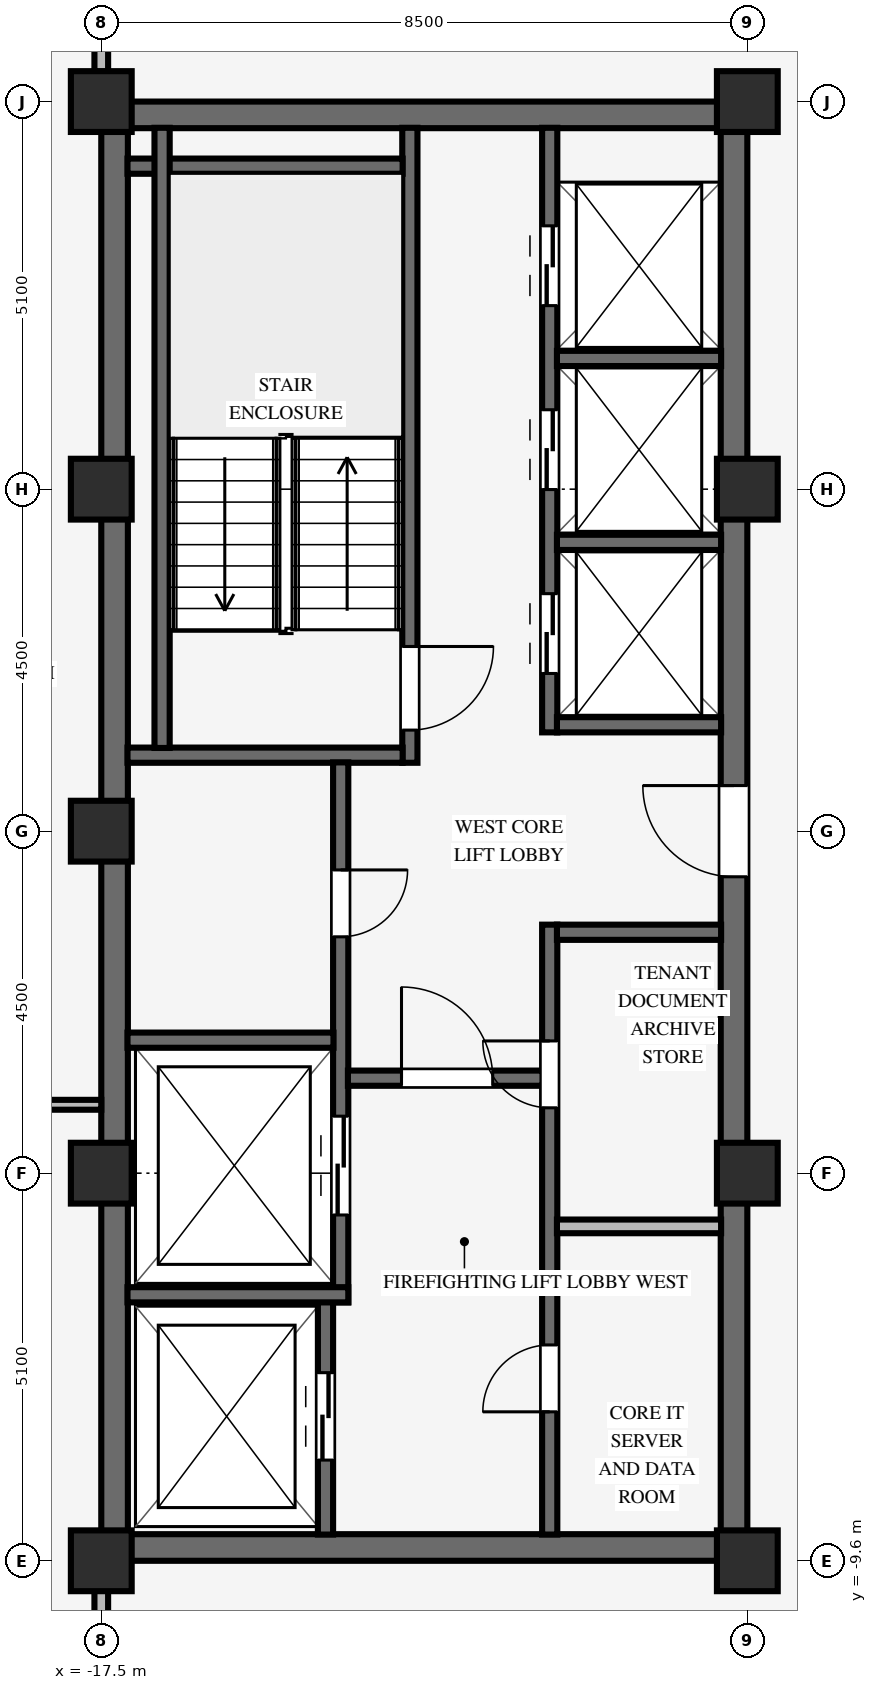
"""IFC4 building model, lengths in metres.
Left out: names, types, materials, properties, quantities, classifications, styles, units other than length and angle.
Written with IfcOpenShell. Run it as: python <this file> out.ifc"""

import sys

from ifc_helpers import new_model, si_unit, direction, frame, frame_2d, origin, origin_2d, place, context, subcontext, project, spatial, rectangle, extrude, source, transform, mapped, element, fill, save


model = new_model("IFC4")
c1 = context("Model", 3, precision=1e-05, world=origin(), true_north=direction((0.0, 1.0)))
c2 = subcontext(c1, "Body", "Model", "MODEL_VIEW")
j1 = project(units=[si_unit("LENGTHUNIT", "METRE"), si_unit("PLANEANGLEUNIT", "RADIAN")], contexts=[c1])
p1 = place(None, origin())
s1 = spatial("IfcSite", under=j1, at=p1, CompositionType="ELEMENT")
p2 = place(p1, origin())
s2 = spatial("IfcBuilding", under=s1, at=p2, CompositionType="ELEMENT")
p3 = place(p2, frame((0.0, 0.0, 268.9)))
s3 = spatial("IfcBuildingStorey", under=s2, at=p3, CompositionType="ELEMENT", Elevation=268.9)
for number, where, z_axis, x_axis in (
    (1, (-17.5, -9.425, 0.0), (0.0, 0.0, 1.0), (1.0, 0.0, 0.0)),
    (2, (-17.5, 9.425, 0.0), (0.0, 0.0, 1.0), (1.0, 0.0, 0.0)),
):
    element("IfcWall", number, at=place(p3, frame(where, z_axis=z_axis, x_axis=x_axis)), inside=s3, PredefinedType="SHEAR", context=c2, shape_type="SweptSolid", body=[
        extrude(rectangle(XDim=8.5, YDim=0.35, at=frame_2d((4.25, 0.0))), origin(), (0.0, 0.0, 1.0), 3.37),
    ])
p4 = place(p3, frame((-17.325, -9.255, 0.0), z_axis=(0.0, 0.0, 1.0), x_axis=(0.0, 1.0, 0.0)))
e3 = element("IfcWall", 3, at=p4, inside=s3, PredefinedType="SHEAR", context=c2, shape_type="SweptSolid", body=[
    extrude(rectangle(XDim=18.51, YDim=0.35, at=frame_2d((9.255, 0.0))), origin(), (0.0, 0.0, 1.0), 3.37),
])
p5 = place(p3, frame((-9.175, -9.255, 0.0), z_axis=(0.0, 0.0, 1.0), x_axis=(0.0, 1.0, 0.0)))
e4 = element("IfcWall", 4, at=p5, inside=s3, PredefinedType="SHEAR", context=c2, shape_type="SweptSolid", body=[
    extrude(rectangle(XDim=18.51, YDim=0.35, at=frame_2d((9.255, 0.0))), origin(), (0.0, 0.0, 1.0), 3.37),
])
p6 = place(p5, frame((8.655, 0.0, 0.0)))
e5 = element("IfcOpeningElement", 5, at=p6, cuts=e4, PredefinedType="OPENING", context=c2, shape_type="SweptSolid", body=[
    extrude(rectangle(XDim=1.2, YDim=2.15, at=frame_2d((0.6, 1.075))), frame((0.0, 0.185, 0.0), z_axis=(0.0, -1.0, 0.0), x_axis=(1.0, 0.0, 0.0)), (0.0, 0.0, 1.0), 0.37),
])
for number, where, z_axis, x_axis in (
    (6, (-17.5, -9.6, 0.0), (0.0, 0.0, 1.0), (1.0, 0.0, 0.0)),
    (7, (-17.5, -4.5, 0.0), (0.0, 0.0, 1.0), (1.0, 0.0, 0.0)),
    (8, (-17.5, 4.5, 0.0), (0.0, 0.0, 1.0), (1.0, 0.0, 0.0)),
    (9, (-17.5, 9.6, 0.0), (0.0, 0.0, 1.0), (1.0, 0.0, 0.0)),
    (10, (-9.0, -9.6, 0.0), (0.0, 0.0, 1.0), (1.0, 0.0, 0.0)),
    (11, (-9.0, -4.5, 0.0), (0.0, 0.0, 1.0), (1.0, 0.0, 0.0)),
    (12, (-9.0, 4.5, 0.0), (0.0, 0.0, 1.0), (1.0, 0.0, 0.0)),
    (13, (-9.0, 9.6, 0.0), (0.0, 0.0, 1.0), (1.0, 0.0, 0.0)),
    (14, (-17.5, 0.0, 0.0), (0.0, 0.0, 1.0), (1.0, 0.0, 0.0)),
):
    element("IfcColumn", number, at=place(p3, frame(where, z_axis=z_axis, x_axis=x_axis)), inside=s3, PredefinedType="COLUMN", context=c2, shape_type="SweptSolid", body=[
        extrude(rectangle(XDim=0.8, YDim=0.8, at=origin_2d()), origin(), (0.0, 0.0, 1.0), 3.37),
    ])
p7 = place(p3, frame((-13.44, 0.9, 0.0), z_axis=(0.0, 0.0, 1.0), x_axis=(0.0, 1.0, 0.0)))
e15 = element("IfcWall", 15, at=p7, inside=s3, PredefinedType="SHEAR", context=c2, shape_type="SweptSolid", body=[
    extrude(rectangle(XDim=8.355, YDim=0.2, at=frame_2d((4.177, 0.0))), origin(), (0.0, 0.0, 1.0), 3.37),
])
p8 = place(p7, frame((1.53, 0.0, 0.0), z_axis=(0.0, 0.0, 1.0), x_axis=(-1.0, 0.0, 0.0)))
e16 = element("IfcOpeningElement", 16, at=p8, cuts=e15, PredefinedType="OPENING", context=c2, shape_type="SweptSolid", body=[
    extrude(rectangle(XDim=1.1, YDim=2.15, at=frame_2d((0.55, 1.075))), frame((0.0, 0.11, 0.0), z_axis=(0.0, -1.0, 0.0), x_axis=(1.0, 0.0, 0.0)), (0.0, 0.0, 1.0), 0.22),
])
for number, where, z_axis, x_axis in (
    (17, (-17.155, 1.0, 0.0), (0.0, 0.0, 1.0), (1.0, 0.0, 0.0)),
    (18, (-17.155, 8.75, 0.0), (0.0, 0.0, 1.0), (1.0, 0.0, 0.0)),
):
    element("IfcWall", number, at=place(p3, frame(where, z_axis=z_axis, x_axis=x_axis)), inside=s3, PredefinedType="SHEAR", context=c2, shape_type="SweptSolid", body=[
        extrude(rectangle(XDim=3.62, YDim=0.2, at=frame_2d((1.81, 0.0))), origin(), (0.0, 0.0, 1.0), 3.37),
    ])
p9 = place(p3, frame((-16.7, 1.095, 0.0), z_axis=(0.0, 0.0, 1.0), x_axis=(0.0, 1.0, 0.0)))
e19 = element("IfcWall", 19, at=p9, inside=s3, PredefinedType="SHEAR", context=c2, shape_type="SweptSolid", body=[
    extrude(rectangle(XDim=8.16, YDim=0.2, at=frame_2d((4.08, 0.0))), origin(), (0.0, 0.0, 1.0), 3.37),
])
p10 = place(p3, frame((-14.55, -9.255, 0.0), z_axis=(0.0, 0.0, 1.0), x_axis=(0.0, 1.0, 0.0)))
e20 = element("IfcWall", 20, at=p10, inside=s3, PredefinedType="SHEAR", context=c2, shape_type="SweptSolid", body=[
    extrude(rectangle(XDim=3.06, YDim=0.2, at=frame_2d((1.53, 0.0))), origin(), (0.0, 0.0, 1.0), 3.37),
])
p11 = place(p10, frame((0.98, 0.0, 0.0)))
e21 = element("IfcOpeningElement", 21, at=p11, cuts=e20, PredefinedType="OPENING", context=c2, shape_type="SweptSolid", body=[
    extrude(rectangle(XDim=1.15, YDim=2.15, at=frame_2d((0.575, 1.075))), frame((0.0, 0.11, 0.0), z_axis=(0.0, -1.0, 0.0), x_axis=(1.0, 0.0, 0.0)), (0.0, 0.0, 1.0), 0.22),
])
p12 = place(p3, frame((-14.35, -6.2, 0.0), z_axis=(0.0, 0.0, 1.0), x_axis=(0.0, 1.0, 0.0)))
e22 = element("IfcWall", 22, at=p12, inside=s3, PredefinedType="SHEAR", context=c2, shape_type="SweptSolid", body=[
    extrude(rectangle(XDim=7.105, YDim=0.2, at=frame_2d((3.552, 0.0))), origin(), (0.0, 0.0, 1.0), 3.37),
])
p13 = place(p12, frame((5.69, 0.0, 0.0), z_axis=(0.0, 0.0, 1.0), x_axis=(-1.0, 0.0, 0.0)))
e23 = element("IfcOpeningElement", 23, at=p13, cuts=e22, PredefinedType="OPENING", context=c2, shape_type="SweptSolid", body=[
    extrude(rectangle(XDim=0.88, YDim=2.1, at=frame_2d((0.44, 1.05))), frame((0.0, 0.11, 0.0), z_axis=(0.0, -1.0, 0.0), x_axis=(1.0, 0.0, 0.0)), (0.0, 0.0, 1.0), 0.22),
])
p14 = place(p12, frame((1.15, 0.0, 0.0)))
e24 = element("IfcOpeningElement", 24, at=p14, cuts=e22, PredefinedType="OPENING", context=c2, shape_type="SweptSolid", body=[
    extrude(rectangle(XDim=1.3, YDim=2.2, at=frame_2d((0.65, 1.1))), frame((0.0, 0.11, 0.0), z_axis=(0.0, -1.0, 0.0), x_axis=(1.0, 0.0, 0.0)), (0.0, 0.0, 1.0), 0.22),
])
p15 = place(p3, frame((-17.155, -6.1, 0.0), z_axis=(0.0, 0.0, 1.0), x_axis=(1.0, 0.0, 0.0)))
e25 = element("IfcWall", 25, at=p15, inside=s3, PredefinedType="SHEAR", context=c2, shape_type="SweptSolid", body=[
    extrude(rectangle(XDim=2.905, YDim=0.2, at=frame_2d((1.453, 0.0))), origin(), (0.0, 0.0, 1.0), 3.37),
])
p16 = place(p3, frame((-17.155, -2.75, 0.0), z_axis=(0.0, 0.0, 1.0), x_axis=(1.0, 0.0, 0.0)))
e26 = element("IfcWall", 26, at=p16, inside=s3, PredefinedType="SHEAR", context=c2, shape_type="SweptSolid", body=[
    extrude(rectangle(XDim=2.71, YDim=0.2, at=frame_2d((1.355, 0.0))), origin(), (0.0, 0.0, 1.0), 3.37),
])
p17 = place(p3, frame((-11.6, -9.255, 0.0), z_axis=(0.0, 0.0, 1.0), x_axis=(0.0, 1.0, 0.0)))
e27 = element("IfcWall", 27, at=p17, inside=s3, PredefinedType="SHEAR", context=c2, shape_type="SweptSolid", body=[
    extrude(rectangle(XDim=8.025, YDim=0.2, at=frame_2d((4.012, 0.0))), origin(), (0.0, 0.0, 1.0), 3.37),
])
p18 = place(p17, frame((1.615, 0.0, 0.0)))
e28 = element("IfcOpeningElement", 28, at=p18, cuts=e27, PredefinedType="OPENING", context=c2, shape_type="SweptSolid", body=[
    extrude(rectangle(XDim=0.88, YDim=2.1, at=frame_2d((0.44, 1.05))), frame((0.0, 0.11, 0.0), z_axis=(0.0, -1.0, 0.0), x_axis=(1.0, 0.0, 0.0)), (0.0, 0.0, 1.0), 0.22),
])
p19 = place(p17, frame((5.615, 0.0, 0.0)))
e29 = element("IfcOpeningElement", 29, at=p19, cuts=e27, PredefinedType="OPENING", context=c2, shape_type="SweptSolid", body=[
    extrude(rectangle(XDim=0.88, YDim=2.1, at=frame_2d((0.44, 1.05))), frame((0.0, 0.11, 0.0), z_axis=(0.0, -1.0, 0.0), x_axis=(1.0, 0.0, 0.0)), (0.0, 0.0, 1.0), 0.22),
])
p20 = place(p3, frame((-14.255, -3.25, 0.0), z_axis=(0.0, 0.0, 1.0), x_axis=(1.0, 0.0, 0.0)))
e30 = element("IfcWall", 30, at=p20, inside=s3, PredefinedType="SHEAR", context=c2, shape_type="SweptSolid", body=[
    extrude(rectangle(XDim=2.56, YDim=0.2, at=frame_2d((1.28, 0.0))), origin(), (0.0, 0.0, 1.0), 3.37),
])
p21 = place(p20, frame((0.705, 0.0, 0.0)))
e31 = element("IfcOpeningElement", 31, at=p21, cuts=e30, PredefinedType="OPENING", context=c2, shape_type="SweptSolid", body=[
    extrude(rectangle(XDim=1.2, YDim=2.15, at=frame_2d((0.6, 1.075))), frame((0.0, 0.11, 0.0), z_axis=(0.0, -1.0, 0.0), x_axis=(1.0, 0.0, 0.0)), (0.0, 0.0, 1.0), 0.22),
])
p22 = place(p3, frame((-11.505, -1.33, 0.0), z_axis=(0.0, 0.0, 1.0), x_axis=(1.0, 0.0, 0.0)))
e32 = element("IfcWall", 32, at=p22, inside=s3, PredefinedType="SHEAR", context=c2, shape_type="SweptSolid", body=[
    extrude(rectangle(XDim=2.16, YDim=0.2, at=frame_2d((1.08, 0.0))), origin(), (0.0, 0.0, 1.0), 3.37),
])
p23 = place(p3, frame((-11.505, -5.2, 0.0), z_axis=(0.0, 0.0, 1.0), x_axis=(1.0, 0.0, 0.0)))
e33 = element("IfcWall", 33, at=p23, inside=s3, PredefinedType="PARTITIONING", context=c2, shape_type="SweptSolid", body=[
    extrude(rectangle(XDim=2.16, YDim=0.18, at=frame_2d((1.08, 0.0))), origin(), (0.0, 0.0, 1.0), 3.36),
])
p24 = place(p3, frame((-11.6, 1.3, 0.0), z_axis=(0.0, 0.0, 1.0), x_axis=(0.0, 1.0, 0.0)))
e34 = element("IfcWall", 34, at=p24, inside=s3, PredefinedType="SHEAR", context=c2, shape_type="SweptSolid", body=[
    extrude(rectangle(XDim=7.955, YDim=0.2, at=frame_2d((3.978, 0.0))), origin(), (0.0, 0.0, 1.0), 3.37),
])
p25 = place(p24, frame((0.775, 0.0, 0.0)))
e35 = element("IfcOpeningElement", 35, at=p25, cuts=e34, PredefinedType="OPENING", context=c2, shape_type="SweptSolid", body=[
    extrude(rectangle(XDim=1.05, YDim=2.15, at=frame_2d((0.525, 1.075))), frame((0.0, 0.11, 0.0), z_axis=(0.0, -1.0, 0.0), x_axis=(1.0, 0.0, 0.0)), (0.0, 0.0, 1.0), 0.22),
])
p26 = place(p24, frame((3.195, 0.0, 0.0)))
e36 = element("IfcOpeningElement", 36, at=p26, cuts=e34, PredefinedType="OPENING", context=c2, shape_type="SweptSolid", body=[
    extrude(rectangle(XDim=1.05, YDim=2.15, at=frame_2d((0.525, 1.075))), frame((0.0, 0.11, 0.0), z_axis=(0.0, -1.0, 0.0), x_axis=(1.0, 0.0, 0.0)), (0.0, 0.0, 1.0), 0.22),
])
p27 = place(p24, frame((5.615, 0.0, 0.0)))
e37 = element("IfcOpeningElement", 37, at=p27, cuts=e34, PredefinedType="OPENING", context=c2, shape_type="SweptSolid", body=[
    extrude(rectangle(XDim=1.05, YDim=2.15, at=frame_2d((0.525, 1.075))), frame((0.0, 0.11, 0.0), z_axis=(0.0, -1.0, 0.0), x_axis=(1.0, 0.0, 0.0)), (0.0, 0.0, 1.0), 0.22),
])
for number, where, z_axis, x_axis in (
    (38, (-11.505, 1.4, 0.0), (0.0, 0.0, 1.0), (1.0, 0.0, 0.0)),
    (39, (-11.505, 3.8, 0.0), (0.0, 0.0, 1.0), (1.0, 0.0, 0.0)),
    (40, (-11.505, 6.22, 0.0), (0.0, 0.0, 1.0), (1.0, 0.0, 0.0)),
):
    element("IfcWall", number, at=place(p3, frame(where, z_axis=z_axis, x_axis=x_axis)), inside=s3, PredefinedType="SHEAR", context=c2, shape_type="SweptSolid", body=[
        extrude(rectangle(XDim=2.16, YDim=0.2, at=frame_2d((1.08, 0.0))), origin(), (0.0, 0.0, 1.0), 3.37),
    ])
p28 = place(p3, frame((-20.7, -3.6, 0.0), z_axis=(0.0, 0.0, 1.0), x_axis=(1.0, 0.0, 0.0)))
e41 = element("IfcWall", 41, at=p28, inside=s3, PredefinedType="PARTITIONING", context=c2, shape_type="SweptSolid", body=[
    extrude(rectangle(XDim=3.2, YDim=0.13, at=frame_2d((1.6, 0.0))), origin(), (0.0, 0.0, 1.0), 3.36),
])
for number, where, z_axis, x_axis in (
    (42, (-17.5, -11.114, 0.0), (0.0, 0.0, 1.0), (0.0, 1.0, 0.0)),
    (43, (-17.5, 9.996, 0.0), (0.0, 0.0, 1.0), (0.0, 1.0, 0.0)),
):
    element("IfcWall", number, at=place(p3, frame(where, z_axis=z_axis, x_axis=x_axis)), inside=s3, PredefinedType="PARTITIONING", context=c2, shape_type="SweptSolid", body=[
        extrude(rectangle(XDim=1.118, YDim=0.18, at=frame_2d((0.559, 0.0))), origin(), (0.0, 0.0, 1.0), 2.892),
    ])
m1 = source(origin(), c2, "Body", "SweptSolid", [
    extrude(rectangle(XDim=1.1, YDim=2.15, at=frame_2d((0.55, 1.075))), frame((0.0, 0.025, 0.0), z_axis=(0.0, -1.0, 0.0), x_axis=(1.0, 0.0, 0.0)), (0.0, 0.0, 1.0), 0.05),
])
p29 = place(p8, origin())
e44 = element("IfcDoor", 44, at=p29, inside=s3, OperationType="SINGLE_SWING_LEFT", PredefinedType="DOOR", context=c2, shape_type="MappedRepresentation", body=[
    mapped(m1, transform((0.0, 0.0, 0.0), scale=1.0)),
])
fill(e16, e44)
m2 = source(origin(), c2, "Body", "SweptSolid", [
    extrude(rectangle(XDim=0.88, YDim=2.1, at=frame_2d((0.44, 1.05))), frame((0.0, 0.025, 0.0), z_axis=(0.0, -1.0, 0.0), x_axis=(1.0, 0.0, 0.0)), (0.0, 0.0, 1.0), 0.05),
])
p30 = place(p13, origin())
e45 = element("IfcDoor", 45, at=p30, inside=s3, OperationType="SINGLE_SWING_LEFT", PredefinedType="DOOR", context=c2, shape_type="MappedRepresentation", body=[
    mapped(m2, transform((0.0, 0.0, 0.0), scale=1.0)),
])
fill(e23, e45)
m3 = source(origin(), c2, "Body", "SweptSolid", [
    extrude(rectangle(XDim=1.2, YDim=2.15, at=frame_2d((0.6, 1.075))), frame((0.0, 0.025, 0.0), z_axis=(0.0, -1.0, 0.0), x_axis=(1.0, 0.0, 0.0)), (0.0, 0.0, 1.0), 0.05),
])
p31 = place(p21, origin())
e46 = element("IfcDoor", 46, at=p31, inside=s3, OperationType="SINGLE_SWING_LEFT", PredefinedType="DOOR", context=c2, shape_type="MappedRepresentation", body=[
    mapped(m3, transform((0.0, 0.0, 0.0), scale=1.0)),
])
fill(e31, e46)
p32 = place(p18, origin())
e47 = element("IfcDoor", 47, at=p32, inside=s3, OperationType="SINGLE_SWING_LEFT", PredefinedType="DOOR", context=c2, shape_type="MappedRepresentation", body=[
    mapped(m2, transform((0.0, 0.0, 0.0), scale=1.0)),
])
fill(e28, e47)
p33 = place(p19, origin())
e48 = element("IfcDoor", 48, at=p33, inside=s3, OperationType="SINGLE_SWING_RIGHT", PredefinedType="DOOR", context=c2, shape_type="MappedRepresentation", body=[
    mapped(m2, transform((0.0, 0.0, 0.0), scale=1.0)),
])
fill(e29, e48)
p34 = place(p6, origin())
e49 = element("IfcDoor", 49, at=p34, inside=s3, OperationType="SINGLE_SWING_RIGHT", PredefinedType="DOOR", context=c2, shape_type="MappedRepresentation", body=[
    mapped(m3, transform((0.0, 0.0, 0.0), scale=1.0)),
])
fill(e5, e49)
m4 = source(origin(), c2, "Body", "SweptSolid", [
    extrude(rectangle(XDim=1.15, YDim=2.15, at=frame_2d((0.575, 1.075))), frame((0.0, 0.025, 0.0), z_axis=(0.0, -1.0, 0.0), x_axis=(1.0, 0.0, 0.0)), (0.0, 0.0, 1.0), 0.05),
])
p35 = place(p11, origin())
e50 = element("IfcDoor", 50, at=p35, inside=s3, OperationType="DOUBLE_DOOR_SLIDING", PredefinedType="DOOR", context=c2, shape_type="MappedRepresentation", body=[
    mapped(m4, transform((0.0, 0.0, 0.0), scale=1.0)),
])
fill(e21, e50)
m5 = source(origin(), c2, "Body", "SweptSolid", [
    extrude(rectangle(XDim=1.3, YDim=2.2, at=frame_2d((0.65, 1.1))), frame((0.0, 0.025, 0.0), z_axis=(0.0, -1.0, 0.0), x_axis=(1.0, 0.0, 0.0)), (0.0, 0.0, 1.0), 0.05),
])
p36 = place(p14, origin())
e51 = element("IfcDoor", 51, at=p36, inside=s3, OperationType="DOUBLE_DOOR_SLIDING", PredefinedType="DOOR", context=c2, shape_type="MappedRepresentation", body=[
    mapped(m5, transform((0.0, 0.0, 0.0), scale=1.0)),
])
fill(e24, e51)
m6 = source(origin(), c2, "Body", "SweptSolid", [
    extrude(rectangle(XDim=1.05, YDim=2.15, at=frame_2d((0.525, 1.075))), frame((0.0, 0.025, 0.0), z_axis=(0.0, -1.0, 0.0), x_axis=(1.0, 0.0, 0.0)), (0.0, 0.0, 1.0), 0.05),
])
p37 = place(p25, origin())
e52 = element("IfcDoor", 52, at=p37, inside=s3, OperationType="DOUBLE_DOOR_SLIDING", PredefinedType="DOOR", context=c2, shape_type="MappedRepresentation", body=[
    mapped(m6, transform((0.0, 0.0, 0.0), scale=1.0)),
])
fill(e35, e52)
p38 = place(p26, origin())
e53 = element("IfcDoor", 53, at=p38, inside=s3, OperationType="DOUBLE_DOOR_SLIDING", PredefinedType="DOOR", context=c2, shape_type="MappedRepresentation", body=[
    mapped(m6, transform((0.0, 0.0, 0.0), scale=1.0)),
])
fill(e36, e53)
p39 = place(p27, origin())
e54 = element("IfcDoor", 54, at=p39, inside=s3, OperationType="DOUBLE_DOOR_SLIDING", PredefinedType="DOOR", context=c2, shape_type="MappedRepresentation", body=[
    mapped(m6, transform((0.0, 0.0, 0.0), scale=1.0)),
])
fill(e37, e54)
save(model, sys.argv[1])
